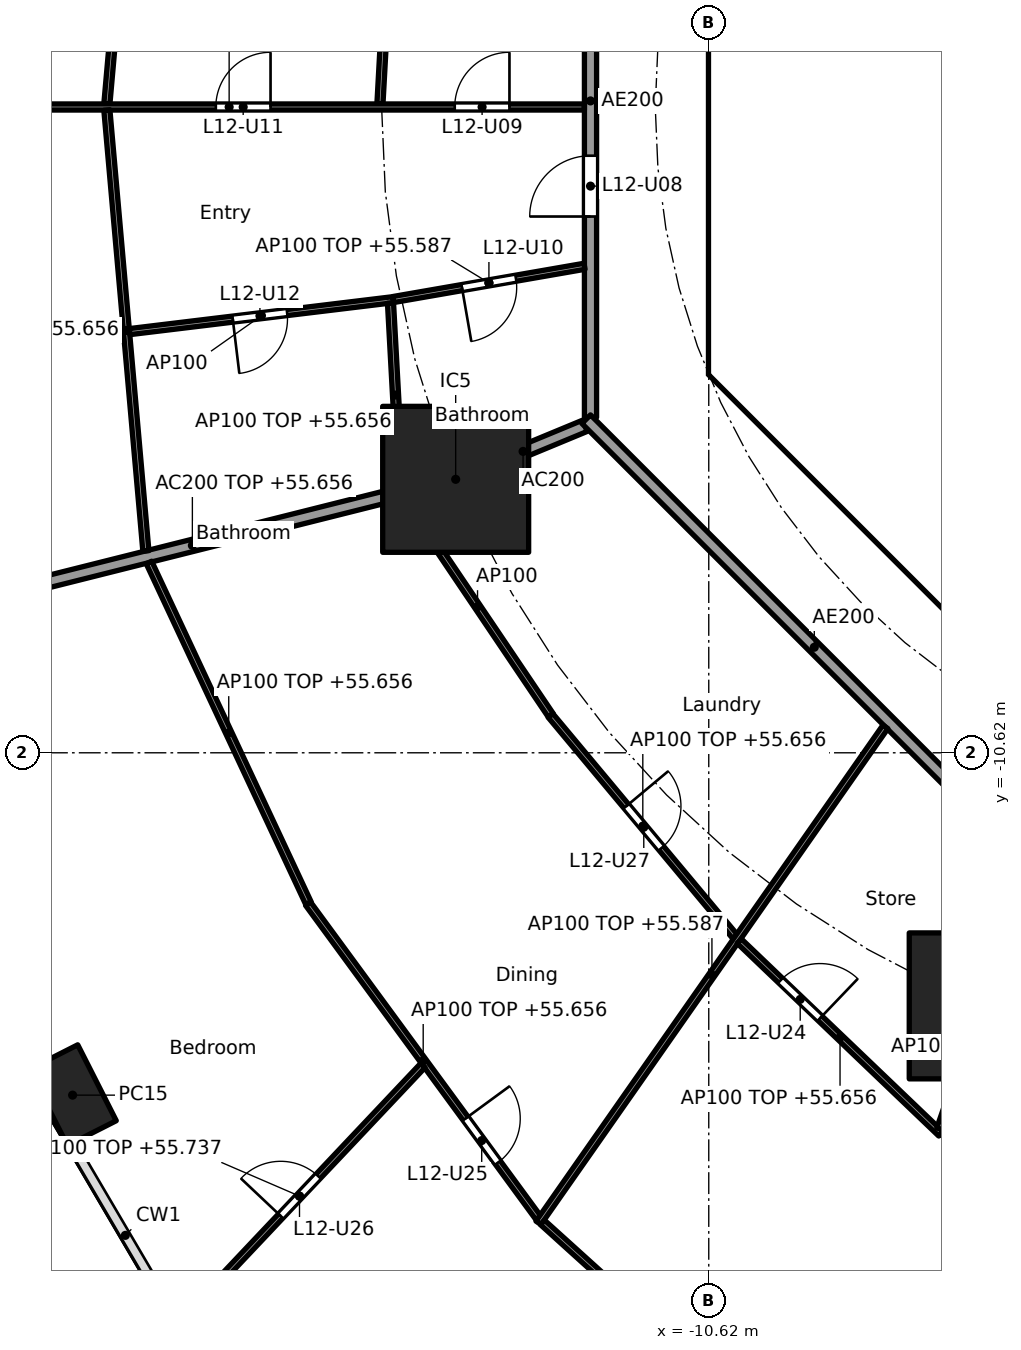
"""IFC4 building model, lengths in metres.
Left out: names, types, materials, properties, quantities, classifications, styles, units other than length and angle.
Written with IfcOpenShell. Run it as: python <this file> out.ifc"""

import sys

from ifc_helpers import new_model, si_unit, direction, frame, frame_2d, origin, origin_2d, place, context, subcontext, project, spatial, polyline, rectangle, hollow_rectangle, outline, extrude, element, fill, save


model = new_model("IFC4")
c1 = context("Model", 3, precision=1e-05, world=origin(), true_north=direction((0.0, 1.0)))
c2 = subcontext(c1, "Body", "Model", "MODEL_VIEW")
j1 = project(units=[si_unit("LENGTHUNIT", "METRE"), si_unit("PLANEANGLEUNIT", "RADIAN")], contexts=[c1])
p1 = place(None, origin())
s1 = spatial("IfcSite", under=j1, at=p1, CompositionType="ELEMENT")
p2 = place(p1, origin())
s2 = spatial("IfcBuilding", under=s1, at=p2, CompositionType="ELEMENT")
p3 = place(p2, frame((0.0, 0.0, 52.9)))
s3 = spatial("IfcBuildingStorey", under=s2, at=p3, CompositionType="ELEMENT", Elevation=52.9)
p4 = place(p3, frame((-21.082, -16.25, 0.0), z_axis=(0.0, 0.0, 1.0), x_axis=(0.452462697578, -0.891783329795, 0.0)))
e1 = element("IfcColumn", 1, at=p4, inside=s3, PredefinedType="COLUMN", context=c2, shape_type="SweptSolid", body=[
    extrude(hollow_rectangle(XDim=1.4, YDim=0.9, WallThickness=0.05, at=origin_2d()), origin(), (0.0, 0.0, 1.0), 3.7),
])
for number, where, z_axis, x_axis in (
    (2, (-14.782, -6.123, 0.0), (0.0, 0.0, 1.0), (1.0, 0.0, 0.0)),
    (3, (-6.123, -14.782, 0.0), (0.0, 0.0, 1.0), (1.0, 0.0, 0.0)),
):
    element("IfcColumn", number, at=place(p3, frame(where, z_axis=z_axis, x_axis=x_axis)), inside=s3, PredefinedType="COLUMN", context=c2, shape_type="SweptSolid", body=[
        extrude(rectangle(XDim=2.4, YDim=2.4, at=origin_2d()), origin(), (0.0, 0.0, 1.0), 3.7),
    ])
p5 = place(p3, frame((-10.325, 3.801, 0.0), z_axis=(0.0, 0.0, 1.0), x_axis=(0.0, -1.0, 0.0)))
e4 = element("IfcWall", 4, at=p5, inside=s3, PredefinedType="SHEAR", context=c2, shape_type="SweptSolid", body=[
    extrude(rectangle(XDim=7.602, YDim=0.6, at=frame_2d((3.801, 0.0))), origin(), (0.0, 0.0, 1.0), 3.44),
])
p6 = place(p5, frame((0.651, 0.0, 0.0)))
e5 = element("IfcOpeningElement", 5, at=p6, cuts=e4, PredefinedType="OPENING", context=c2, shape_type="SweptSolid", body=[
    extrude(rectangle(XDim=1.5, YDim=2.1, at=frame_2d((0.75, 1.05))), frame((0.0, 0.31, 0.0), z_axis=(0.0, -1.0, 0.0), x_axis=(1.0, 0.0, 0.0)), (0.0, 0.0, 1.0), 0.62),
])
p7 = place(p5, frame((5.451, 0.0, 0.0)))
e6 = element("IfcOpeningElement", 6, at=p7, cuts=e4, PredefinedType="OPENING", context=c2, shape_type="SweptSolid", body=[
    extrude(rectangle(XDim=1.5, YDim=2.1, at=frame_2d((0.75, 1.05))), frame((0.0, 0.31, 0.0), z_axis=(0.0, -1.0, 0.0), x_axis=(1.0, 0.0, 0.0)), (0.0, 0.0, 1.0), 0.62),
])
p8 = place(p3, frame((-9.988, -4.613, 0.0), z_axis=(0.0, 0.0, 1.0), x_axis=(0.707106781187, -0.707106781187, 0.0)))
e7 = element("IfcWall", 7, at=p8, inside=s3, PredefinedType="SHEAR", context=c2, shape_type="SweptSolid", body=[
    extrude(rectangle(XDim=7.602, YDim=0.6, at=frame_2d((3.801, 0.0))), origin(), (0.0, 0.0, 1.0), 3.44),
])
p9 = place(p8, frame((6.151, 0.0, 0.0)))
e8 = element("IfcOpeningElement", 8, at=p9, cuts=e7, PredefinedType="OPENING", context=c2, shape_type="SweptSolid", body=[
    extrude(rectangle(XDim=1.1, YDim=2.1, at=frame_2d((0.55, 1.05))), frame((0.0, 0.31, 0.0), z_axis=(0.0, -1.0, 0.0), x_axis=(1.0, 0.0, 0.0)), (0.0, 0.0, 1.0), 0.62),
])
p10 = place(p3, origin())
e9 = element("IfcWall", 9, at=p10, inside=s3, PredefinedType="SHEAR", context=c2, shape_type="SweptSolid", body=[
    extrude(outline(polyline([(-10.625, -3.801), (-10.025, -3.801), (-10.025, -4.152), (-9.776, -4.401), (-10.2, -4.825), (-10.625, -4.401), (-10.625, -3.801)])), origin(), (0.0, 0.0, 1.0), 3.44),
])
p11 = place(p3, frame((-10.025, -4.0, 0.0), z_axis=(0.0, 0.0, 1.0), x_axis=(1.0, 0.0, 0.0)))
e10 = element("IfcWall", 10, at=p11, inside=s3, PredefinedType="PARTITIONING", context=c2, shape_type="SweptSolid", body=[
    extrude(rectangle(XDim=3.325, YDim=0.2, at=frame_2d((1.662, 0.0))), origin(), (0.0, 0.0, 1.0), 3.44),
])
p12 = place(p3, frame((-12.657, -5.243, 0.0), z_axis=(0.0, 0.0, 1.0), x_axis=(-0.923885664896, -0.382668627144, 0.0)))
e11 = element("IfcWall", 11, at=p12, inside=s3, PredefinedType="PARTITIONING", context=c2, shape_type="SweptSolid", body=[
    extrude(rectangle(XDim=2.2, YDim=0.2, at=frame_2d((1.1, 0.0))), origin(), (0.0, 0.0, 1.0), 3.44),
])
p13 = place(p3, frame((-14.831, -6.135, 0.0), z_axis=(0.0, 0.0, 1.0), x_axis=(-0.969884949569, -0.243563512454, 0.0)))
e12 = element("IfcWall", 12, at=p13, inside=s3, PredefinedType="PARTITIONING", context=c2, shape_type="SweptSolid", body=[
    extrude(rectangle(XDim=8.829, YDim=0.2, at=frame_2d((4.415, 0.0))), origin(), (0.0, 0.0, 1.0), 2.756),
])
p14 = place(p3, frame((-12.565, 5.304, 0.0), z_axis=(0.0, 0.0, 1.0), x_axis=(0.0, -1.0, 0.0)))
e13 = element("IfcWall", 13, at=p14, inside=s3, PredefinedType="PARTITIONING", context=c2, shape_type="SweptSolid", body=[
    extrude(rectangle(XDim=10.409, YDim=0.2, at=frame_2d((5.205, 0.0))), origin(), (0.0, 0.0, 1.0), 3.44),
])
p15 = place(p14, frame((6.106, 0.0, 0.0)))
e14 = element("IfcOpeningElement", 14, at=p15, cuts=e13, PredefinedType="OPENING", context=c2, shape_type="SweptSolid", body=[
    extrude(rectangle(XDim=1.0, YDim=2.1, at=frame_2d((0.5, 1.05))), frame((0.0, 0.11, 0.0), z_axis=(0.0, -1.0, 0.0), x_axis=(1.0, 0.0, 0.0)), (0.0, 0.0, 1.0), 0.22),
])
p16 = place(p3, frame((-12.635, -5.134, 0.0), z_axis=(0.0, 0.0, 1.0), x_axis=(0.707106781187, -0.707106781187, 0.0)))
e15 = element("IfcWall", 15, at=p16, inside=s3, PredefinedType="PARTITIONING", context=c2, shape_type="SweptSolid", body=[
    extrude(rectangle(XDim=10.609, YDim=0.2, at=frame_2d((5.305, 0.0))), origin(), (0.0, 0.0, 1.0), 3.44),
])
p17 = place(p3, frame((-15.688, 6.249, 0.0), z_axis=(0.0, 0.0, 1.0), x_axis=(-0.054659814056, -0.998505034903, 0.0)))
e16 = element("IfcWall", 16, at=p17, inside=s3, PredefinedType="PARTITIONING", context=c2, shape_type="SweptSolid", body=[
    extrude(rectangle(XDim=6.208, YDim=0.1, at=frame_2d((3.104, 0.0))), origin(), (0.0, 0.0, 1.0), 2.756),
])
p18 = place(p3, frame((-19.877, 7.301, 0.0), z_axis=(0.0, 0.0, 1.0), x_axis=(-0.088143415068, -0.996107794558, 0.0)))
e17 = element("IfcWall", 17, at=p18, inside=s3, PredefinedType="PARTITIONING", context=c2, shape_type="SweptSolid", body=[
    extrude(rectangle(XDim=7.279, YDim=0.1, at=frame_2d((3.64, 0.0))), origin(), (0.0, 0.0, 1.0), 2.756),
])
p19 = place(p18, frame((3.189, 0.0, 0.0)))
e18 = element("IfcOpeningElement", 18, at=p19, cuts=e17, PredefinedType="OPENING", context=c2, shape_type="SweptSolid", body=[
    extrude(rectangle(XDim=0.9, YDim=2.1, at=frame_2d((0.45, 1.05))), frame((0.0, 0.06, 0.0), z_axis=(0.0, -1.0, 0.0), x_axis=(1.0, 0.0, 0.0)), (0.0, 0.0, 1.0), 0.12),
])
p20 = place(p3, frame((-12.665, 0.0, 0.0), z_axis=(0.0, 0.0, 1.0), x_axis=(-1.0, 0.0, 0.0)))
e19 = element("IfcWall", 19, at=p20, inside=s3, PredefinedType="PARTITIONING", context=c2, shape_type="SweptSolid", body=[
    extrude(rectangle(XDim=11.685, YDim=0.1, at=frame_2d((5.843, 0.0))), origin(), (0.0, 0.0, 1.0), 2.687),
])
p21 = place(p20, frame((1.233, 0.0, 0.0)))
e20 = element("IfcOpeningElement", 20, at=p21, cuts=e19, PredefinedType="OPENING", context=c2, shape_type="SweptSolid", body=[
    extrude(rectangle(XDim=0.9, YDim=2.1, at=frame_2d((0.45, 1.05))), frame((0.0, 0.06, 0.0), z_axis=(0.0, -1.0, 0.0), x_axis=(1.0, 0.0, 0.0)), (0.0, 0.0, 1.0), 0.12),
])
p22 = place(p20, frame((5.162, 0.0, 0.0)))
e21 = element("IfcOpeningElement", 21, at=p22, cuts=e19, PredefinedType="OPENING", context=c2, shape_type="SweptSolid", body=[
    extrude(rectangle(XDim=0.9, YDim=2.1, at=frame_2d((0.45, 1.05))), frame((0.0, 0.06, 0.0), z_axis=(0.0, -1.0, 0.0), x_axis=(1.0, 0.0, 0.0)), (0.0, 0.0, 1.0), 0.12),
])
p23 = place(p20, frame((9.322, 0.0, 0.0)))
e22 = element("IfcOpeningElement", 22, at=p23, cuts=e19, PredefinedType="OPENING", context=c2, shape_type="SweptSolid", body=[
    extrude(rectangle(XDim=0.9, YDim=2.1, at=frame_2d((0.45, 1.05))), frame((0.0, 0.06, 0.0), z_axis=(0.0, -1.0, 0.0), x_axis=(1.0, 0.0, 0.0)), (0.0, 0.0, 1.0), 0.12),
])
p24 = place(p3, frame((-20.518, -0.05, 0.0), z_axis=(0.0, 0.0, 1.0), x_axis=(0.088143415068, -0.996107794558, 0.0)))
e23 = element("IfcWall", 23, at=p24, inside=s3, PredefinedType="PARTITIONING", context=c2, shape_type="SweptSolid", body=[
    extrude(rectangle(XDim=7.279, YDim=0.1, at=frame_2d((3.64, 0.0))), origin(), (0.0, 0.0, 1.0), 2.756),
])
p25 = place(p3, frame((-12.663, -2.619, 0.0), z_axis=(0.0, 0.0, 1.0), x_axis=(-0.985220176102, -0.171292745325, 0.0)))
e24 = element("IfcWall", 24, at=p25, inside=s3, PredefinedType="PARTITIONING", context=c2, shape_type="SweptSolid", body=[
    extrude(rectangle(XDim=3.191, YDim=0.1, at=frame_2d((1.596, 0.0))), origin(), (0.0, 0.0, 1.0), 2.687),
])
p26 = place(p25, frame((1.146, 0.0, 0.0)))
e25 = element("IfcOpeningElement", 25, at=p26, cuts=e24, PredefinedType="OPENING", context=c2, shape_type="SweptSolid", body=[
    extrude(rectangle(XDim=0.9, YDim=2.1, at=frame_2d((0.45, 1.05))), frame((0.0, 0.06, 0.0), z_axis=(0.0, -1.0, 0.0), x_axis=(1.0, 0.0, 0.0)), (0.0, 0.0, 1.0), 0.12),
])
p27 = place(p3, frame((-15.807, -3.168, 0.0), z_axis=(0.0, 0.0, 1.0), x_axis=(-0.992741666002, -0.120266306938, 0.0)))
e26 = element("IfcWall", 26, at=p27, inside=s3, PredefinedType="PARTITIONING", context=c2, shape_type="SweptSolid", body=[
    extrude(rectangle(XDim=4.371, YDim=0.1, at=frame_2d((2.185, 0.0))), origin(), (0.0, 0.0, 1.0), 3.44),
])
p28 = place(p27, frame((1.76, 0.0, 0.0)))
e27 = element("IfcOpeningElement", 27, at=p28, cuts=e26, PredefinedType="OPENING", context=c2, shape_type="SweptSolid", body=[
    extrude(rectangle(XDim=0.9, YDim=2.1, at=frame_2d((0.45, 1.05))), frame((0.0, 0.06, 0.0), z_axis=(0.0, -1.0, 0.0), x_axis=(1.0, 0.0, 0.0)), (0.0, 0.0, 1.0), 0.12),
])
p29 = place(p3, frame((-15.854, -3.225, 0.0), z_axis=(0.0, 0.0, 1.0), x_axis=(0.054644199943, -0.998505889523, 0.0)))
e28 = element("IfcWall", 28, at=p29, inside=s3, PredefinedType="PARTITIONING", context=c2, shape_type="SweptSolid", body=[
    extrude(rectangle(XDim=3.029, YDim=0.1, at=frame_2d((1.515, 0.0))), origin(), (0.0, 0.0, 1.0), 2.756),
])
p30 = place(p3, frame((-15.627, -6.432, 0.0), z_axis=(0.0, 0.0, 1.0), x_axis=(0.559112679527, -0.829091678641, 0.0)))
e29 = element("IfcWall", 29, at=p30, inside=s3, PredefinedType="PARTITIONING", context=c2, shape_type="SweptSolid", body=[
    extrude(rectangle(XDim=4.308, YDim=0.1, at=frame_2d((2.154, 0.0))), origin(), (0.0, 0.0, 1.0), 3.44),
])
p31 = place(p3, frame((-19.826, -7.491, 0.0), z_axis=(0.0, 0.0, 1.0), x_axis=(0.423926333401, -0.905696673202, 0.0)))
e30 = element("IfcWall", 30, at=p31, inside=s3, PredefinedType="PARTITIONING", context=c2, shape_type="SweptSolid", body=[
    extrude(rectangle(XDim=6.188, YDim=0.1, at=frame_2d((3.094, 0.0))), origin(), (0.0, 0.0, 1.0), 2.756),
])
p32 = place(p3, frame((-13.222, -10.007, 0.0), z_axis=(0.0, 0.0, 1.0), x_axis=(0.640807748916, -0.767701393075, 0.0)))
e31 = element("IfcWall", 31, at=p32, inside=s3, PredefinedType="PARTITIONING", context=c2, shape_type="SweptSolid", body=[
    extrude(rectangle(XDim=4.737, YDim=0.1, at=frame_2d((2.368, 0.0))), origin(), (0.0, 0.0, 1.0), 2.756),
])
p33 = place(p32, frame((1.943, 0.0, 0.0)))
e32 = element("IfcOpeningElement", 32, at=p33, cuts=e31, PredefinedType="OPENING", context=c2, shape_type="SweptSolid", body=[
    extrude(rectangle(XDim=0.9, YDim=2.1, at=frame_2d((0.45, 1.05))), frame((0.0, 0.06, 0.0), z_axis=(0.0, -1.0, 0.0), x_axis=(1.0, 0.0, 0.0)), (0.0, 0.0, 1.0), 0.12),
])
p34 = place(p3, frame((-17.211, -13.1, 0.0), z_axis=(0.0, 0.0, 1.0), x_axis=(0.591206785834, -0.806520016109, 0.0)))
e33 = element("IfcWall", 33, at=p34, inside=s3, PredefinedType="PARTITIONING", context=c2, shape_type="SweptSolid", body=[
    extrude(rectangle(XDim=6.41, YDim=0.1, at=frame_2d((3.205, 0.0))), origin(), (0.0, 0.0, 1.0), 2.756),
])
p35 = place(p34, frame((4.383, 0.0, 0.0)))
e34 = element("IfcOpeningElement", 34, at=p35, cuts=e33, PredefinedType="OPENING", context=c2, shape_type="SweptSolid", body=[
    extrude(rectangle(XDim=0.9, YDim=2.1, at=frame_2d((0.45, 1.05))), frame((0.0, 0.06, 0.0), z_axis=(0.0, -1.0, 0.0), x_axis=(1.0, 0.0, 0.0)), (0.0, 0.0, 1.0), 0.12),
])
p36 = place(p3, frame((-15.321, -15.761, 0.0), z_axis=(0.0, 0.0, 1.0), x_axis=(-0.686519245775, -0.727111631856, 0.0)))
e35 = element("IfcWall", 35, at=p36, inside=s3, PredefinedType="PARTITIONING", context=c2, shape_type="SweptSolid", body=[
    extrude(rectangle(XDim=5.912, YDim=0.1, at=frame_2d((2.956, 0.0))), origin(), (0.0, 0.0, 1.0), 2.837),
])
p37 = place(p36, frame((2.506, 0.0, 0.0)))
e36 = element("IfcOpeningElement", 36, at=p37, cuts=e35, PredefinedType="OPENING", context=c2, shape_type="SweptSolid", body=[
    extrude(rectangle(XDim=0.9, YDim=2.1, at=frame_2d((0.45, 1.05))), frame((0.0, 0.06, 0.0), z_axis=(0.0, -1.0, 0.0), x_axis=(1.0, 0.0, 0.0)), (0.0, 0.0, 1.0), 0.12),
])
p38 = place(p3, frame((-7.715, -10.193, 0.0), z_axis=(0.0, 0.0, 1.0), x_axis=(-0.573126502256, -0.819466907454, 0.0)))
e37 = element("IfcWall", 37, at=p38, inside=s3, PredefinedType="PARTITIONING", context=c2, shape_type="SweptSolid", body=[
    extrude(rectangle(XDim=9.954, YDim=0.1, at=frame_2d((4.977, 0.0))), origin(), (0.0, 0.0, 1.0), 2.687),
])
p39 = place(p3, frame((-10.119, -13.716, 0.0), z_axis=(0.0, 0.0, 1.0), x_axis=(0.722763212502, -0.69109575216, 0.0)))
e38 = element("IfcWall", 38, at=p39, inside=s3, PredefinedType="PARTITIONING", context=c2, shape_type="SweptSolid", body=[
    extrude(rectangle(XDim=4.587, YDim=0.1, at=frame_2d((2.293, 0.0))), origin(), (0.0, 0.0, 1.0), 2.756),
])
p40 = place(p39, frame((0.938, 0.0, 0.0)))
e39 = element("IfcOpeningElement", 39, at=p40, cuts=e38, PredefinedType="OPENING", context=c2, shape_type="SweptSolid", body=[
    extrude(rectangle(XDim=0.9, YDim=2.1, at=frame_2d((0.45, 1.05))), frame((0.0, 0.06, 0.0), z_axis=(0.0, -1.0, 0.0), x_axis=(1.0, 0.0, 0.0)), (0.0, 0.0, 1.0), 0.12),
])
p41 = place(p3, frame((-13.355, -18.343, 0.0), z_axis=(0.0, 0.0, 1.0), x_axis=(0.741720189244, -0.670709445936, 0.0)))
e40 = element("IfcWall", 40, at=p41, inside=s3, PredefinedType="PARTITIONING", context=c2, shape_type="SweptSolid", body=[
    extrude(rectangle(XDim=6.209, YDim=0.1, at=frame_2d((3.104, 0.0))), origin(), (0.0, 0.0, 1.0), 2.756),
])
p42 = place(p41, frame((2.63, 0.0, 0.0)))
e41 = element("IfcOpeningElement", 41, at=p42, cuts=e40, PredefinedType="OPENING", context=c2, shape_type="SweptSolid", body=[
    extrude(rectangle(XDim=0.9, YDim=2.1, at=frame_2d((0.45, 1.05))), frame((0.0, 0.06, 0.0), z_axis=(0.0, -1.0, 0.0), x_axis=(1.0, 0.0, 0.0)), (0.0, 0.0, 1.0), 0.12),
])
p43 = place(p3, frame((-6.139, -14.83, 0.0), z_axis=(0.0, 0.0, 1.0), x_axis=(-0.327246993321, -0.944938836837, 0.0)))
e42 = element("IfcWall", 42, at=p43, inside=s3, PredefinedType="PARTITIONING", context=c2, shape_type="SweptSolid", body=[
    extrude(rectangle(XDim=2.09, YDim=0.1, at=frame_2d((1.045, 0.0))), origin(), (0.0, 0.0, 1.0), 3.44),
])
p44 = place(p3, frame((-6.791, -16.862, 0.0), z_axis=(0.0, 0.0, 1.0), x_axis=(0.979581941859, -0.201045316246, 0.0)))
e43 = element("IfcWall", 43, at=p44, inside=s3, PredefinedType="PARTITIONING", context=c2, shape_type="SweptSolid", body=[
    extrude(rectangle(XDim=2.256, YDim=0.1, at=frame_2d((1.128, 0.0))), origin(), (0.0, 0.0, 1.0), 2.756),
])
p45 = place(p3, frame((-3.492, -12.662, 0.0), z_axis=(0.0, 0.0, 1.0), x_axis=(-0.219268088006, -0.975664648115, 0.0)))
e44 = element("IfcWall", 44, at=p45, inside=s3, PredefinedType="PARTITIONING", context=c2, shape_type="SweptSolid", body=[
    extrude(rectangle(XDim=18.23, YDim=0.1, at=frame_2d((9.115, 0.0))), origin(), (0.0, 0.0, 1.0), 2.687),
])
p46 = place(p45, frame((0.35, 0.0, 0.0)))
e45 = element("IfcOpeningElement", 45, at=p46, cuts=e44, PredefinedType="OPENING", context=c2, shape_type="SweptSolid", body=[
    extrude(rectangle(XDim=0.9, YDim=2.1, at=frame_2d((0.45, 1.05))), frame((0.0, 0.06, 0.0), z_axis=(0.0, -1.0, 0.0), x_axis=(1.0, 0.0, 0.0)), (0.0, 0.0, 1.0), 0.12),
])
p47 = place(p45, frame((7.497, 0.0, 0.0)))
e46 = element("IfcOpeningElement", 46, at=p47, cuts=e44, PredefinedType="OPENING", context=c2, shape_type="SweptSolid", body=[
    extrude(rectangle(XDim=0.9, YDim=2.1, at=frame_2d((0.45, 1.05))), frame((0.0, 0.06, 0.0), z_axis=(0.0, -1.0, 0.0), x_axis=(1.0, 0.0, 0.0)), (0.0, 0.0, 1.0), 0.12),
])
p48 = place(p45, frame((14.223, 0.0, 0.0)))
e47 = element("IfcOpeningElement", 47, at=p48, cuts=e44, PredefinedType="OPENING", context=c2, shape_type="SweptSolid", body=[
    extrude(rectangle(XDim=0.9, YDim=2.1, at=frame_2d((0.45, 1.05))), frame((0.0, 0.06, 0.0), z_axis=(0.0, -1.0, 0.0), x_axis=(1.0, 0.0, 0.0)), (0.0, 0.0, 1.0), 0.12),
])
p49 = place(p7, origin())
e48 = element("IfcDoor", 48, at=p49, inside=s3, OperationType="DOUBLE_DOOR_SINGLE_SWING", PredefinedType="DOOR", context=c2, shape_type="SweptSolid", body=[
    extrude(rectangle(XDim=1.5, YDim=2.1, at=frame_2d((0.75, 1.05))), frame((0.0, 0.025, 0.0), z_axis=(0.0, -1.0, 0.0), x_axis=(1.0, 0.0, 0.0)), (0.0, 0.0, 1.0), 0.05),
])
fill(e6, e48)
p50 = place(p15, frame((1.0, 0.0, 0.0), x_axis=(-1.0, 0.0, 0.0)))
e49 = element("IfcDoor", 49, at=p50, inside=s3, OperationType="SINGLE_SWING_LEFT", PredefinedType="DOOR", context=c2, shape_type="SweptSolid", body=[
    extrude(rectangle(XDim=1.0, YDim=2.1, at=frame_2d((0.5, 1.05))), frame((0.0, 0.025, 0.0), z_axis=(0.0, -1.0, 0.0), x_axis=(1.0, 0.0, 0.0)), (0.0, 0.0, 1.0), 0.05),
])
fill(e14, e49)
p51 = place(p21, frame((0.9, 0.0, 0.0), x_axis=(-1.0, 0.0, 0.0)))
e50 = element("IfcDoor", 50, at=p51, inside=s3, OperationType="SINGLE_SWING_RIGHT", PredefinedType="DOOR", context=c2, shape_type="SweptSolid", body=[
    extrude(rectangle(XDim=0.9, YDim=2.1, at=frame_2d((0.45, 1.05))), frame((0.0, 0.025, 0.0), z_axis=(0.0, -1.0, 0.0), x_axis=(1.0, 0.0, 0.0)), (0.0, 0.0, 1.0), 0.05),
])
fill(e20, e50)
p52 = place(p26, origin())
e51 = element("IfcDoor", 51, at=p52, inside=s3, OperationType="SINGLE_SWING_RIGHT", PredefinedType="DOOR", context=c2, shape_type="SweptSolid", body=[
    extrude(rectangle(XDim=0.9, YDim=2.1, at=frame_2d((0.45, 1.05))), frame((0.0, 0.025, 0.0), z_axis=(0.0, -1.0, 0.0), x_axis=(1.0, 0.0, 0.0)), (0.0, 0.0, 1.0), 0.05),
])
fill(e25, e51)
p53 = place(p22, frame((0.9, 0.0, 0.0), x_axis=(-1.0, 0.0, 0.0)))
e52 = element("IfcDoor", 52, at=p53, inside=s3, OperationType="SINGLE_SWING_RIGHT", PredefinedType="DOOR", context=c2, shape_type="SweptSolid", body=[
    extrude(rectangle(XDim=0.9, YDim=2.1, at=frame_2d((0.45, 1.05))), frame((0.0, 0.025, 0.0), z_axis=(0.0, -1.0, 0.0), x_axis=(1.0, 0.0, 0.0)), (0.0, 0.0, 1.0), 0.05),
])
fill(e21, e52)
p54 = place(p28, origin())
e53 = element("IfcDoor", 53, at=p54, inside=s3, OperationType="SINGLE_SWING_RIGHT", PredefinedType="DOOR", context=c2, shape_type="SweptSolid", body=[
    extrude(rectangle(XDim=0.9, YDim=2.1, at=frame_2d((0.45, 1.05))), frame((0.0, 0.025, 0.0), z_axis=(0.0, -1.0, 0.0), x_axis=(1.0, 0.0, 0.0)), (0.0, 0.0, 1.0), 0.05),
])
fill(e27, e53)
p55 = place(p40, origin())
e54 = element("IfcDoor", 54, at=p55, inside=s3, OperationType="SINGLE_SWING_RIGHT", PredefinedType="DOOR", context=c2, shape_type="SweptSolid", body=[
    extrude(rectangle(XDim=0.9, YDim=2.1, at=frame_2d((0.45, 1.05))), frame((0.0, 0.025, 0.0), z_axis=(0.0, -1.0, 0.0), x_axis=(1.0, 0.0, 0.0)), (0.0, 0.0, 1.0), 0.05),
])
fill(e39, e54)
p56 = place(p35, origin())
e55 = element("IfcDoor", 55, at=p56, inside=s3, OperationType="SINGLE_SWING_LEFT", PredefinedType="DOOR", context=c2, shape_type="SweptSolid", body=[
    extrude(rectangle(XDim=0.9, YDim=2.1, at=frame_2d((0.45, 1.05))), frame((0.0, 0.025, 0.0), z_axis=(0.0, -1.0, 0.0), x_axis=(1.0, 0.0, 0.0)), (0.0, 0.0, 1.0), 0.05),
])
fill(e34, e55)
p57 = place(p37, frame((0.9, 0.0, 0.0), x_axis=(-1.0, 0.0, 0.0)))
e56 = element("IfcDoor", 56, at=p57, inside=s3, OperationType="SINGLE_SWING_LEFT", PredefinedType="DOOR", context=c2, shape_type="SweptSolid", body=[
    extrude(rectangle(XDim=0.9, YDim=2.1, at=frame_2d((0.45, 1.05))), frame((0.0, 0.025, 0.0), z_axis=(0.0, -1.0, 0.0), x_axis=(1.0, 0.0, 0.0)), (0.0, 0.0, 1.0), 0.05),
])
fill(e36, e56)
p58 = place(p33, origin())
e57 = element("IfcDoor", 57, at=p58, inside=s3, OperationType="SINGLE_SWING_LEFT", PredefinedType="DOOR", context=c2, shape_type="SweptSolid", body=[
    extrude(rectangle(XDim=0.9, YDim=2.1, at=frame_2d((0.45, 1.05))), frame((0.0, 0.025, 0.0), z_axis=(0.0, -1.0, 0.0), x_axis=(1.0, 0.0, 0.0)), (0.0, 0.0, 1.0), 0.05),
])
fill(e32, e57)
save(model, sys.argv[1])
